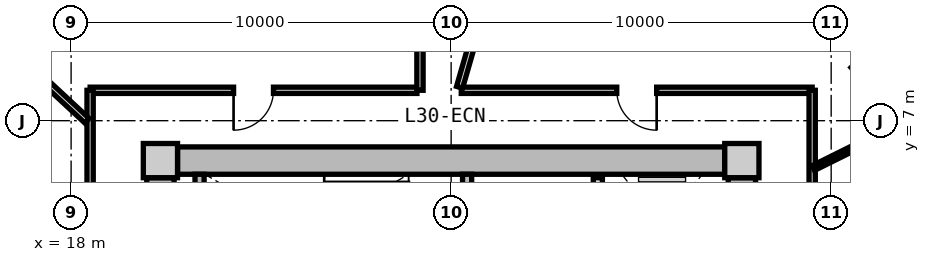
"""IFC4 building model, lengths in metres.
Left out: names, types, materials, properties, quantities, classifications, styles, units other than length and angle.
Written with IfcOpenShell. Run it as: python <this file> out.ifc"""

import sys

from ifc_helpers import new_model, si_unit, direction, frame, frame_2d, origin, origin_2d, place, context, subcontext, project, spatial, rectangle, extrude, source, transform, mapped, element, fill, save


model = new_model("IFC4")
c1 = context("Model", 3, precision=1e-05, world=origin(), true_north=direction((0.0, 1.0)))
c2 = subcontext(c1, "Body", "Model", "MODEL_VIEW")
j1 = project(units=[si_unit("LENGTHUNIT", "METRE"), si_unit("PLANEANGLEUNIT", "RADIAN")], contexts=[c1])
p1 = place(None, origin())
s1 = spatial("IfcSite", under=j1, at=p1, CompositionType="ELEMENT")
p2 = place(p1, origin())
s2 = spatial("IfcBuilding", under=s1, at=p2, CompositionType="ELEMENT")
p3 = place(p2, frame((0.0, 0.0, 99.3)))
s3 = spatial("IfcBuildingStorey", under=s2, at=p3, CompositionType="ELEMENT", Elevation=99.3)
m1 = source(origin(), c2, "Body", "SweptSolid", [
    extrude(rectangle(XDim=0.9, YDim=0.9, at=origin_2d()), origin(), (0.0, 0.0, 1.0), 3.05),
])
for number, where, z_axis, x_axis in (
    (1, (35.65, 5.95, 0.0), (0.0, 0.0, 1.0), (1.0, 0.0, 0.0)),
    (2, (20.35, 5.95, 0.0), (0.0, 0.0, 1.0), (1.0, 0.0, 0.0)),
):
    element("IfcColumn", number, at=place(p3, frame(where, z_axis=z_axis, x_axis=x_axis)), inside=s3, PredefinedType="COLUMN", context=c2, shape_type="MappedRepresentation", body=[
        mapped(m1, transform((0.0, 0.0, 0.0), x_axis=(1.0, 0.0, 0.0), y_axis=(0.0, 1.0, 0.0), z_axis=(0.0, 0.0, 1.0), scale=1.0)),
    ])
m2 = source(origin(), c2, "Body", "SweptSolid", [
    extrude(rectangle(XDim=14.4, YDim=0.72, at=frame_2d((7.2, 0.0))), origin(), (0.0, 0.0, 1.0), 2.79),
])
p4 = place(p3, frame((20.8, 5.95, 0.0), z_axis=(0.0, 0.0, 1.0), x_axis=(1.0, 0.0, 0.0)))
e3 = element("IfcWall", 3, at=p4, inside=s3, PredefinedType="SHEAR", context=c2, shape_type="MappedRepresentation", body=[
    mapped(m2, transform((0.0, 0.0, 0.0), x_axis=(1.0, 0.0, 0.0), y_axis=(0.0, 1.0, 0.0), z_axis=(0.0, 0.0, 1.0), scale=1.0)),
])
m3 = source(origin(), c2, "Body", "SweptSolid", [
    extrude(rectangle(XDim=11.0, YDim=0.72, at=frame_2d((5.5, 0.0))), origin(), (0.0, 0.0, 1.0), 2.79),
])
p5 = place(p3, frame((20.35, -5.5, 0.0), z_axis=(0.0, 0.0, 1.0), x_axis=(0.0, 1.0, 0.0)))
e4 = element("IfcWall", 4, at=p5, inside=s3, PredefinedType="SHEAR", context=c2, shape_type="MappedRepresentation", body=[
    mapped(m3, transform((0.0, 0.0, 0.0), x_axis=(1.0, 0.0, 0.0), y_axis=(0.0, 1.0, 0.0), z_axis=(0.0, 0.0, 1.0), scale=1.0)),
])
p6 = place(p5, frame((3.8, 0.0, 0.0)))
e5 = element("IfcOpeningElement", 5, at=p6, cuts=e4, PredefinedType="OPENING", context=c2, shape_type="SweptSolid", body=[
    extrude(rectangle(XDim=1.2, YDim=2.15, at=frame_2d((0.6, 1.075))), frame((0.0, 0.37, 0.0), z_axis=(0.0, -1.0, 0.0), x_axis=(1.0, 0.0, 0.0)), (0.0, 0.0, 1.0), 0.74),
])
p7 = place(p3, frame((35.65, 5.5, 0.0), z_axis=(0.0, 0.0, 1.0), x_axis=(0.0, -1.0, 0.0)))
e6 = element("IfcWall", 6, at=p7, inside=s3, PredefinedType="SHEAR", context=c2, shape_type="MappedRepresentation", body=[
    mapped(m3, transform((0.0, 0.0, 0.0), x_axis=(1.0, 0.0, 0.0), y_axis=(0.0, 1.0, 0.0), z_axis=(0.0, 0.0, 1.0), scale=1.0)),
])
p8 = place(p7, frame((5.65, 0.0, 0.0)))
e7 = element("IfcOpeningElement", 7, at=p8, cuts=e6, PredefinedType="OPENING", context=c2, shape_type="SweptSolid", body=[
    extrude(rectangle(XDim=1.2, YDim=2.15, at=frame_2d((0.6, 1.075))), frame((0.0, 0.37, 0.0), z_axis=(0.0, -1.0, 0.0), x_axis=(1.0, 0.0, 0.0)), (0.0, 0.0, 1.0), 0.74),
])
m4 = source(origin(), c2, "Body", "SweptSolid", [
    extrude(rectangle(XDim=3.14, YDim=0.24, at=frame_2d((1.57, 0.0))), origin(), (0.0, 0.0, 1.0), 2.79),
])
p9 = place(p3, frame((21.38, 2.45, 0.0), z_axis=(0.0, 0.0, 1.0), x_axis=(0.0, 1.0, 0.0)))
e8 = element("IfcWall", 8, at=p9, inside=s3, PredefinedType="PARTITIONING", context=c2, shape_type="MappedRepresentation", body=[
    mapped(m4, transform((0.0, 0.0, 0.0), x_axis=(1.0, 0.0, 0.0), y_axis=(0.0, 1.0, 0.0), z_axis=(0.0, 0.0, 1.0), scale=1.0)),
])
p10 = place(p3, frame((28.42, 2.45, 0.0), z_axis=(0.0, 0.0, 1.0), x_axis=(0.0, 1.0, 0.0)))
e9 = element("IfcWall", 9, at=p10, inside=s3, PredefinedType="PARTITIONING", context=c2, shape_type="MappedRepresentation", body=[
    mapped(m4, transform((0.0, 0.0, 0.0), x_axis=(1.0, 0.0, 0.0), y_axis=(0.0, 1.0, 0.0), z_axis=(0.0, 0.0, 1.0), scale=1.0)),
])
p11 = place(p10, frame((0.55, 0.0, 0.0)))
e10 = element("IfcOpeningElement", 10, at=p11, cuts=e9, PredefinedType="OPENING", context=c2, shape_type="SweptSolid", body=[
    extrude(rectangle(XDim=1.1, YDim=2.15, at=frame_2d((0.55, 1.075))), frame((0.0, 0.13, 0.0), z_axis=(0.0, -1.0, 0.0), x_axis=(1.0, 0.0, 0.0)), (0.0, 0.0, 1.0), 0.26),
])
m5 = source(origin(), c2, "Body", "SweptSolid", [
    extrude(rectangle(XDim=5.0, YDim=0.24, at=frame_2d((2.5, 0.0))), origin(), (0.0, 0.0, 1.0), 2.775),
])
p12 = place(p3, frame((31.86, 0.5, 0.0), z_axis=(0.0, 0.0, 1.0), x_axis=(0.0, 1.0, 0.0)))
e11 = element("IfcWall", 11, at=p12, inside=s3, PredefinedType="PARTITIONING", context=c2, shape_type="MappedRepresentation", body=[
    mapped(m5, transform((0.0, 0.0, 0.0), x_axis=(1.0, 0.0, 0.0), y_axis=(0.0, 1.0, 0.0), z_axis=(0.0, 0.0, 1.0), scale=1.0)),
])
p13 = place(p12, frame((3.05, 0.0, 0.0)))
e12 = element("IfcOpeningElement", 12, at=p13, cuts=e11, PredefinedType="OPENING", context=c2, shape_type="SweptSolid", body=[
    extrude(rectangle(XDim=1.3, YDim=2.2, at=frame_2d((0.65, 1.1))), frame((0.0, 0.13, 0.0), z_axis=(0.0, -1.0, 0.0), x_axis=(1.0, 0.0, 0.0)), (0.0, 0.0, 1.0), 0.26),
])
p14 = place(p12, frame((0.55, 0.0, 0.0)))
e13 = element("IfcOpeningElement", 13, at=p14, cuts=e11, PredefinedType="OPENING", context=c2, shape_type="SweptSolid", body=[
    extrude(rectangle(XDim=1.3, YDim=2.2, at=frame_2d((0.65, 1.1))), frame((0.0, 0.13, 0.0), z_axis=(0.0, -1.0, 0.0), x_axis=(1.0, 0.0, 0.0)), (0.0, 0.0, 1.0), 0.26),
])
m6 = source(origin(), c2, "Body", "SweptSolid", [
    extrude(rectangle(XDim=8.6, YDim=0.165, at=frame_2d((4.3, 0.0))), origin(), (0.0, 0.0, 1.0), 2.775),
])
p15 = place(p3, frame((18.5, 7.8, 0.0), z_axis=(0.0, 0.0, 1.0), x_axis=(1.0, 0.0, 0.0)))
e14 = element("IfcWall", 14, at=p15, inside=s3, PredefinedType="PARTITIONING", context=c2, shape_type="MappedRepresentation", body=[
    mapped(m6, transform((0.0, 0.0, 0.0), x_axis=(1.0, 0.0, 0.0), y_axis=(0.0, 1.0, 0.0), z_axis=(0.0, 0.0, 1.0), scale=1.0)),
])
p16 = place(p15, frame((3.775, 0.0, 0.0)))
e15 = element("IfcOpeningElement", 15, at=p16, cuts=e14, PredefinedType="OPENING", context=c2, shape_type="SweptSolid", body=[
    extrude(rectangle(XDim=1.05, YDim=2.15, at=frame_2d((0.525, 1.075))), frame((0.0, 0.093, 0.0), z_axis=(0.0, -1.0, 0.0), x_axis=(1.0, 0.0, 0.0)), (0.0, 0.0, 1.0), 0.185),
])
m7 = source(origin(), c2, "Body", "SweptSolid", [
    extrude(rectangle(XDim=9.234, YDim=0.165, at=frame_2d((4.617, 0.0))), origin(), (0.0, 0.0, 1.0), 2.775),
])
p17 = place(p3, frame((28.266, 7.8, 0.0), z_axis=(0.0, 0.0, 1.0), x_axis=(1.0, 0.0, 0.0)))
e16 = element("IfcWall", 16, at=p17, inside=s3, PredefinedType="PARTITIONING", context=c2, shape_type="MappedRepresentation", body=[
    mapped(m7, transform((0.0, 0.0, 0.0), x_axis=(1.0, 0.0, 0.0), y_axis=(0.0, 1.0, 0.0), z_axis=(0.0, 0.0, 1.0), scale=1.0)),
])
p18 = place(p17, frame((4.092, 0.0, 0.0)))
e17 = element("IfcOpeningElement", 17, at=p18, cuts=e16, PredefinedType="OPENING", context=c2, shape_type="SweptSolid", body=[
    extrude(rectangle(XDim=1.05, YDim=2.15, at=frame_2d((0.525, 1.075))), frame((0.0, 0.093, 0.0), z_axis=(0.0, -1.0, 0.0), x_axis=(1.0, 0.0, 0.0)), (0.0, 0.0, 1.0), 0.185),
])
m8 = source(origin(), c2, "Body", "SweptSolid", [
    extrude(rectangle(XDim=15.6, YDim=0.165, at=frame_2d((7.8, 0.0))), origin(), (0.0, 0.0, 1.0), 2.775),
])
p19 = place(p3, frame((18.5, -7.8, 0.0), z_axis=(0.0, 0.0, 1.0), x_axis=(0.0, 1.0, 0.0)))
e18 = element("IfcWall", 18, at=p19, inside=s3, PredefinedType="PARTITIONING", context=c2, shape_type="MappedRepresentation", body=[
    mapped(m8, transform((0.0, 0.0, 0.0), x_axis=(1.0, 0.0, 0.0), y_axis=(0.0, 1.0, 0.0), z_axis=(0.0, 0.0, 1.0), scale=1.0)),
])
p20 = place(p19, frame((5.673, 0.0, 0.0)))
e19 = element("IfcOpeningElement", 19, at=p20, cuts=e18, PredefinedType="OPENING", context=c2, shape_type="SweptSolid", body=[
    extrude(rectangle(XDim=1.05, YDim=2.15, at=frame_2d((0.525, 1.075))), frame((0.0, 0.093, 0.0), z_axis=(0.0, -1.0, 0.0), x_axis=(1.0, 0.0, 0.0)), (0.0, 0.0, 1.0), 0.185),
])
p21 = place(p3, frame((37.5, 7.8, 0.0), z_axis=(0.0, 0.0, 1.0), x_axis=(0.0, -1.0, 0.0)))
e20 = element("IfcWall", 20, at=p21, inside=s3, PredefinedType="PARTITIONING", context=c2, shape_type="MappedRepresentation", body=[
    mapped(m8, transform((0.0, 0.0, 0.0), x_axis=(1.0, 0.0, 0.0), y_axis=(0.0, 1.0, 0.0), z_axis=(0.0, 0.0, 1.0), scale=1.0)),
])
p22 = place(p21, frame((9.482, 0.0, 0.0)))
e21 = element("IfcOpeningElement", 21, at=p22, cuts=e20, PredefinedType="OPENING", context=c2, shape_type="SweptSolid", body=[
    extrude(rectangle(XDim=1.25, YDim=2.2, at=frame_2d((0.625, 1.1))), frame((0.0, 0.093, 0.0), z_axis=(0.0, -1.0, 0.0), x_axis=(1.0, 0.0, 0.0)), (0.0, 0.0, 1.0), 0.185),
])
m9 = source(origin(), c2, "Body", "SweptSolid", [
    extrude(rectangle(XDim=8.989, YDim=0.165, at=frame_2d((4.495, 0.0))), origin(), (0.0, 0.0, 1.0), 2.275),
])
p23 = place(p3, frame((28.222, 7.88, 0.0), z_axis=(0.0, 0.0, 1.0), x_axis=(0.27702323008, 0.960863221274, 0.0)))
e22 = element("IfcWall", 22, at=p23, inside=s3, PredefinedType="PARTITIONING", context=c2, shape_type="MappedRepresentation", body=[
    mapped(m9, transform((0.0, 0.0, 0.0), x_axis=(1.0, 0.0, 0.0), y_axis=(0.0, 1.0, 0.0), z_axis=(0.0, 0.0, 1.0), scale=1.0)),
])
m10 = source(origin(), c2, "Body", "SweptSolid", [
    extrude(rectangle(XDim=7.482, YDim=0.165, at=frame_2d((3.741, 0.0))), origin(), (0.0, 0.0, 1.0), 2.275),
])
p24 = place(p3, frame((18.42, 6.998, 0.0), z_axis=(0.0, 0.0, 1.0), x_axis=(-0.732508698043, 0.680757671489, 0.0)))
e23 = element("IfcWall", 23, at=p24, inside=s3, PredefinedType="PARTITIONING", context=c2, shape_type="MappedRepresentation", body=[
    mapped(m10, transform((0.0, 0.0, 0.0), x_axis=(1.0, 0.0, 0.0), y_axis=(0.0, 1.0, 0.0), z_axis=(0.0, 0.0, 1.0), scale=1.0)),
])
m11 = source(origin(), c2, "Body", "SweptSolid", [
    extrude(rectangle(XDim=7.56, YDim=0.165, at=frame_2d((3.78, 0.0))), origin(), (0.0, 0.0, 1.0), 2.775),
])
p25 = place(p3, frame((27.18, 7.8, 0.0), z_axis=(0.0, 0.0, 1.0), x_axis=(0.0, 1.0, 0.0)))
e24 = element("IfcWall", 24, at=p25, inside=s3, PredefinedType="PARTITIONING", context=c2, shape_type="MappedRepresentation", body=[
    mapped(m11, transform((0.0, 0.0, 0.0), x_axis=(1.0, 0.0, 0.0), y_axis=(0.0, 1.0, 0.0), z_axis=(0.0, 0.0, 1.0), scale=1.0)),
])
m12 = source(origin(), c2, "Body", "SweptSolid", [
    extrude(rectangle(XDim=3.069, YDim=0.14, at=frame_2d((1.535, 0.0))), origin(), (0.0, 0.0, 1.0), 2.775),
])
p26 = place(p3, frame((18.47, 4.368, 0.0), z_axis=(0.0, 0.0, 1.0), x_axis=(-0.863524911282, 0.504306184371, 0.0)))
e25 = element("IfcWall", 25, at=p26, inside=s3, PredefinedType="PARTITIONING", context=c2, shape_type="MappedRepresentation", body=[
    mapped(m12, transform((0.0, 0.0, 0.0), x_axis=(1.0, 0.0, 0.0), y_axis=(0.0, 1.0, 0.0), z_axis=(0.0, 0.0, 1.0), scale=1.0)),
])
m13 = source(origin(), c2, "Body", "SweptSolid", [
    extrude(rectangle(XDim=1.6, YDim=0.14, at=frame_2d((0.8, 0.0))), origin(), (0.0, 0.0, 1.0), 2.775),
])
p27 = place(p3, frame((37.53, 5.754, 0.0), z_axis=(0.0, 0.0, 1.0), x_axis=(0.895522919837, 0.445015393044, 0.0)))
e26 = element("IfcWall", 26, at=p27, inside=s3, PredefinedType="PARTITIONING", context=c2, shape_type="MappedRepresentation", body=[
    mapped(m13, transform((0.0, 0.0, 0.0), x_axis=(1.0, 0.0, 0.0), y_axis=(0.0, 1.0, 0.0), z_axis=(0.0, 0.0, 1.0), scale=1.0)),
])
m14 = source(origin(), c2, "Body", "SweptSolid", [
    extrude(rectangle(XDim=3.943, YDim=0.115, at=frame_2d((1.972, 0.0))), origin(), (0.0, 0.0, 1.0), 2.775),
])
p28 = place(p3, frame((39.611, 7.37, 0.0), z_axis=(0.0, 0.0, 1.0), x_axis=(-0.699481885754, 0.714650328134, 0.0)))
e27 = element("IfcWall", 27, at=p28, inside=s3, PredefinedType="PARTITIONING", context=c2, shape_type="MappedRepresentation", body=[
    mapped(m14, transform((0.0, 0.0, 0.0), x_axis=(1.0, 0.0, 0.0), y_axis=(0.0, 1.0, 0.0), z_axis=(0.0, 0.0, 1.0), scale=1.0)),
])
p29 = place(p28, frame((1.497, 0.0, 0.0)))
e28 = element("IfcOpeningElement", 28, at=p29, cuts=e27, PredefinedType="OPENING", context=c2, shape_type="SweptSolid", body=[
    extrude(rectangle(XDim=0.95, YDim=2.1, at=frame_2d((0.475, 1.05))), frame((0.0, 0.067, 0.0), z_axis=(0.0, -1.0, 0.0), x_axis=(1.0, 0.0, 0.0)), (0.0, 0.0, 1.0), 0.135),
])
m15 = source(origin(), c2, "Body", "SweptSolid", [
    extrude(rectangle(XDim=1.05, YDim=2.15, at=frame_2d((0.525, 1.075))), frame((0.0, 0.025, 0.0), z_axis=(0.0, -1.0, 0.0), x_axis=(1.0, 0.0, 0.0)), (0.0, 0.0, 1.0), 0.05),
])
p30 = place(p16, frame((1.05, 0.0, 0.0), z_axis=(0.0, 0.0, 1.0), x_axis=(-1.0, 0.0, 0.0)))
e29 = element("IfcDoor", 29, at=p30, inside=s3, OperationType="SINGLE_SWING_RIGHT", PredefinedType="DOOR", context=c2, shape_type="MappedRepresentation", body=[
    mapped(m15, transform((0.0, 0.0, 0.0), x_axis=(1.0, 0.0, 0.0), y_axis=(0.0, 1.0, 0.0), z_axis=(0.0, 0.0, 1.0), scale=1.0)),
])
fill(e15, e29)
p31 = place(p18, frame((1.05, 0.0, 0.0), z_axis=(0.0, 0.0, 1.0), x_axis=(-1.0, 0.0, 0.0)))
e30 = element("IfcDoor", 30, at=p31, inside=s3, OperationType="SINGLE_SWING_LEFT", PredefinedType="DOOR", context=c2, shape_type="MappedRepresentation", body=[
    mapped(m15, transform((0.0, 0.0, 0.0), x_axis=(1.0, 0.0, 0.0), y_axis=(0.0, 1.0, 0.0), z_axis=(0.0, 0.0, 1.0), scale=1.0)),
])
fill(e17, e30)
m16 = source(origin(), c2, "Body", "SweptSolid", [
    extrude(rectangle(XDim=0.95, YDim=2.1, at=frame_2d((0.475, 1.05))), frame((0.0, 0.025, 0.0), z_axis=(0.0, -1.0, 0.0), x_axis=(1.0, 0.0, 0.0)), (0.0, 0.0, 1.0), 0.05),
])
p32 = place(p29, frame((0.95, 0.0, 0.0), z_axis=(0.0, 0.0, 1.0), x_axis=(-1.0, 0.0, 0.0)))
e31 = element("IfcDoor", 31, at=p32, inside=s3, OperationType="SINGLE_SWING_LEFT", PredefinedType="DOOR", context=c2, shape_type="MappedRepresentation", body=[
    mapped(m16, transform((0.0, 0.0, 0.0), x_axis=(1.0, 0.0, 0.0), y_axis=(0.0, 1.0, 0.0), z_axis=(0.0, 0.0, 1.0), scale=1.0)),
])
fill(e28, e31)
save(model, sys.argv[1])
